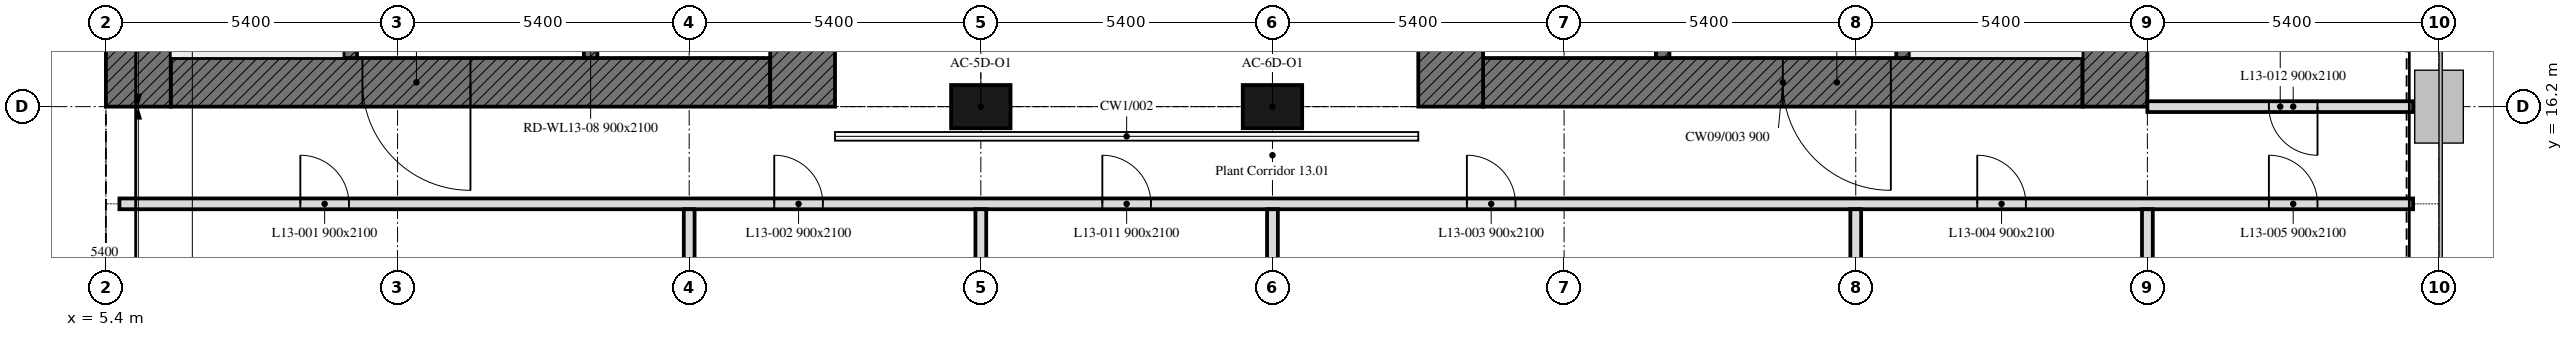
"""IFC4 building model, lengths in metres.
Left out: names, types, materials, properties, quantities, classifications, styles, units other than length and angle.
Written with IfcOpenShell. Run it as: python <this file> out.ifc"""

import sys

from ifc_helpers import new_model, si_unit, direction, frame, frame_2d, origin, origin_2d, place, context, subcontext, project, spatial, rectangle, extrude, element, fill, save


model = new_model("IFC4")
c1 = context("Model", 3, precision=1e-05, world=origin(), true_north=direction((0.0, 1.0)))
c2 = subcontext(c1, "Body", "Model", "MODEL_VIEW")
j1 = project(units=[si_unit("LENGTHUNIT", "METRE"), si_unit("PLANEANGLEUNIT", "RADIAN")], contexts=[c1])
p1 = place(None, origin())
s1 = spatial("IfcSite", under=j1, at=p1, CompositionType="ELEMENT")
p2 = place(p1, origin())
s2 = spatial("IfcBuilding", under=s1, at=p2, CompositionType="ELEMENT")
p3 = place(p2, frame((0.0, 0.0, 60.2)))
s3 = spatial("IfcBuildingStorey", under=s2, at=p3, CompositionType="ELEMENT", Elevation=60.2)
for number, where, z_axis, x_axis in (
    (1, (21.6, 16.2, 0.0), (0.0, 0.0, 1.0), (1.0, 0.0, 0.0)),
    (2, (27.0, 16.2, 0.0), (0.0, 0.0, 1.0), (1.0, 0.0, 0.0)),
):
    element("IfcColumn", number, at=place(p3, frame(where, z_axis=z_axis, x_axis=x_axis)), inside=s3, PredefinedType="COLUMN", context=c2, shape_type="SweptSolid", body=[
        extrude(rectangle(XDim=1.1, YDim=0.8, at=origin_2d()), origin(), (0.0, 0.0, 1.0), 4.5),
    ])
p4 = place(p3, frame((17.7, 16.65, 0.0), z_axis=(0.0, 0.0, 1.0), x_axis=(-1.0, 0.0, 0.0)))
e3 = element("IfcWall", 3, at=p4, inside=s3, PredefinedType="SOLIDWALL", context=c2, shape_type="SweptSolid", body=[
    extrude(rectangle(XDim=11.1, YDim=0.9, at=frame_2d((5.55, 0.0))), origin(), (0.0, 0.0, 1.0), 4.5),
])
p5 = place(p4, frame((5.55, 0.0, 0.0)))
e4 = element("IfcOpeningElement", 4, at=p5, cuts=e3, PredefinedType="OPENING", context=c2, shape_type="SweptSolid", body=[
    extrude(rectangle(XDim=2.0, YDim=2.4, at=frame_2d((1.0, 1.2))), frame((0.0, 0.45, 0.0), z_axis=(0.0, -1.0, 0.0), x_axis=(1.0, 0.0, 0.0)), (0.0, 0.0, 1.0), 0.9),
])
for number, where, z_axis, x_axis in (
    (5, (6.0, 16.2, 0.0), (0.0, 0.0, 1.0), (0.0, 1.0, 0.0)),
    (6, (18.3, 32.4, 0.0), (0.0, 0.0, 1.0), (0.0, -1.0, 0.0)),
):
    element("IfcWall", number, at=place(p3, frame(where, z_axis=z_axis, x_axis=x_axis)), inside=s3, PredefinedType="SOLIDWALL", context=c2, shape_type="SweptSolid", body=[
        extrude(rectangle(XDim=16.2, YDim=1.2, at=frame_2d((8.1, 0.0))), origin(), (0.0, 0.0, 1.0), 4.5),
    ])
p6 = place(p3, frame((9.925, 17.1, 0.0), z_axis=(0.0, 0.0, 1.0), x_axis=(0.0, 1.0, 0.0)))
e7 = element("IfcWall", 7, at=p6, inside=s3, PredefinedType="SOLIDWALL", context=c2, shape_type="SweptSolid", body=[
    extrude(rectangle(XDim=14.4, YDim=0.25, at=frame_2d((7.2, 0.0))), origin(), (0.0, 0.0, 1.0), 4.5),
])
p7 = place(p6, frame((4.6, 0.0, 0.0)))
e8 = element("IfcOpeningElement", 8, at=p7, cuts=e7, PredefinedType="OPENING", context=c2, shape_type="SweptSolid", body=[
    extrude(rectangle(XDim=1.0, YDim=2.1, at=frame_2d((0.5, 1.05))), frame((0.0, 0.125, 0.0), z_axis=(0.0, -1.0, 0.0), x_axis=(1.0, 0.0, 0.0)), (0.0, 0.0, 1.0), 0.25),
])
p8 = place(p6, frame((7.062, 0.0, 0.0)))
e9 = element("IfcOpeningElement", 9, at=p8, cuts=e7, PredefinedType="OPENING", context=c2, shape_type="SweptSolid", body=[
    extrude(rectangle(XDim=1.2, YDim=2.1, at=frame_2d((0.6, 1.05))), frame((0.0, 0.125, 0.0), z_axis=(0.0, -1.0, 0.0), x_axis=(1.0, 0.0, 0.0)), (0.0, 0.0, 1.0), 0.25),
])
p9 = place(p3, frame((14.375, 17.1, 0.0), z_axis=(0.0, 0.0, 1.0), x_axis=(0.0, 1.0, 0.0)))
e10 = element("IfcWall", 10, at=p9, inside=s3, PredefinedType="SOLIDWALL", context=c2, shape_type="SweptSolid", body=[
    extrude(rectangle(XDim=14.4, YDim=0.25, at=frame_2d((7.2, 0.0))), origin(), (0.0, 0.0, 1.0), 4.5),
])
p10 = place(p9, frame((13.15, 0.0, 0.0)))
e11 = element("IfcOpeningElement", 11, at=p10, cuts=e10, PredefinedType="OPENING", context=c2, shape_type="SweptSolid", body=[
    extrude(rectangle(XDim=1.0, YDim=2.1, at=frame_2d((0.5, 1.05))), frame((0.0, 0.125, 0.0), z_axis=(0.0, -1.0, 0.0), x_axis=(1.0, 0.0, 0.0)), (0.0, 0.0, 1.0), 0.25),
])
p11 = place(p9, frame((0.846, 0.0, 0.0)))
e12 = element("IfcOpeningElement", 12, at=p11, cuts=e10, PredefinedType="OPENING", context=c2, shape_type="SweptSolid", body=[
    extrude(rectangle(XDim=0.9, YDim=2.1, at=frame_2d((0.45, 1.05))), frame((0.0, 0.125, 0.0), z_axis=(0.0, -1.0, 0.0), x_axis=(1.0, 0.0, 0.0)), (0.0, 0.0, 1.0), 0.25),
])
p12 = place(p9, frame((3.346, 0.0, 0.0)))
e13 = element("IfcOpeningElement", 13, at=p12, cuts=e10, PredefinedType="OPENING", context=c2, shape_type="SweptSolid", body=[
    extrude(rectangle(XDim=0.9, YDim=2.1, at=frame_2d((0.45, 1.05))), frame((0.0, 0.125, 0.0), z_axis=(0.0, -1.0, 0.0), x_axis=(1.0, 0.0, 0.0)), (0.0, 0.0, 1.0), 0.25),
])
p13 = place(p3, frame((42.0, 16.65, 0.0), z_axis=(0.0, 0.0, 1.0), x_axis=(-1.0, 0.0, 0.0)))
e14 = element("IfcWall", 14, at=p13, inside=s3, PredefinedType="SOLIDWALL", context=c2, shape_type="SweptSolid", body=[
    extrude(rectangle(XDim=11.1, YDim=0.9, at=frame_2d((5.55, 0.0))), origin(), (0.0, 0.0, 1.0), 4.5),
])
p14 = place(p13, frame((3.55, 0.0, 0.0)))
e15 = element("IfcOpeningElement", 15, at=p14, cuts=e14, PredefinedType="OPENING", context=c2, shape_type="SweptSolid", body=[
    extrude(rectangle(XDim=2.0, YDim=2.4, at=frame_2d((1.0, 1.2))), frame((0.0, 0.45, 0.0), z_axis=(0.0, -1.0, 0.0), x_axis=(1.0, 0.0, 0.0)), (0.0, 0.0, 1.0), 0.9),
])
for number, where, z_axis, x_axis in (
    (16, (42.6, 32.4, 0.0), (0.0, 0.0, 1.0), (0.0, -1.0, 0.0)),
    (17, (30.3, 16.2, 0.0), (0.0, 0.0, 1.0), (0.0, 1.0, 0.0)),
):
    element("IfcWall", number, at=place(p3, frame(where, z_axis=z_axis, x_axis=x_axis)), inside=s3, PredefinedType="SOLIDWALL", context=c2, shape_type="SweptSolid", body=[
        extrude(rectangle(XDim=16.2, YDim=1.2, at=frame_2d((8.1, 0.0))), origin(), (0.0, 0.0, 1.0), 4.5),
    ])
p15 = place(p3, frame((38.675, 17.1, 0.0), z_axis=(0.0, 0.0, 1.0), x_axis=(0.0, 1.0, 0.0)))
e18 = element("IfcWall", 18, at=p15, inside=s3, PredefinedType="SOLIDWALL", context=c2, shape_type="SweptSolid", body=[
    extrude(rectangle(XDim=14.4, YDim=0.25, at=frame_2d((7.2, 0.0))), origin(), (0.0, 0.0, 1.0), 4.5),
])
p16 = place(p15, frame((4.6, 0.0, 0.0)))
e19 = element("IfcOpeningElement", 19, at=p16, cuts=e18, PredefinedType="OPENING", context=c2, shape_type="SweptSolid", body=[
    extrude(rectangle(XDim=1.0, YDim=2.1, at=frame_2d((0.5, 1.05))), frame((0.0, 0.125, 0.0), z_axis=(0.0, -1.0, 0.0), x_axis=(1.0, 0.0, 0.0)), (0.0, 0.0, 1.0), 0.25),
])
p17 = place(p15, frame((7.062, 0.0, 0.0)))
e20 = element("IfcOpeningElement", 20, at=p17, cuts=e18, PredefinedType="OPENING", context=c2, shape_type="SweptSolid", body=[
    extrude(rectangle(XDim=1.2, YDim=2.1, at=frame_2d((0.6, 1.05))), frame((0.0, 0.125, 0.0), z_axis=(0.0, -1.0, 0.0), x_axis=(1.0, 0.0, 0.0)), (0.0, 0.0, 1.0), 0.25),
])
p18 = place(p3, frame((34.225, 17.1, 0.0), z_axis=(0.0, 0.0, 1.0), x_axis=(0.0, 1.0, 0.0)))
e21 = element("IfcWall", 21, at=p18, inside=s3, PredefinedType="SOLIDWALL", context=c2, shape_type="SweptSolid", body=[
    extrude(rectangle(XDim=14.4, YDim=0.25, at=frame_2d((7.2, 0.0))), origin(), (0.0, 0.0, 1.0), 4.5),
])
p19 = place(p18, frame((13.15, 0.0, 0.0)))
e22 = element("IfcOpeningElement", 22, at=p19, cuts=e21, PredefinedType="OPENING", context=c2, shape_type="SweptSolid", body=[
    extrude(rectangle(XDim=1.0, YDim=2.1, at=frame_2d((0.5, 1.05))), frame((0.0, 0.125, 0.0), z_axis=(0.0, -1.0, 0.0), x_axis=(1.0, 0.0, 0.0)), (0.0, 0.0, 1.0), 0.25),
])
p20 = place(p18, frame((0.846, 0.0, 0.0)))
e23 = element("IfcOpeningElement", 23, at=p20, cuts=e21, PredefinedType="OPENING", context=c2, shape_type="SweptSolid", body=[
    extrude(rectangle(XDim=0.9, YDim=2.1, at=frame_2d((0.45, 1.05))), frame((0.0, 0.125, 0.0), z_axis=(0.0, -1.0, 0.0), x_axis=(1.0, 0.0, 0.0)), (0.0, 0.0, 1.0), 0.25),
])
p21 = place(p18, frame((3.346, 0.0, 0.0)))
e24 = element("IfcOpeningElement", 24, at=p21, cuts=e21, PredefinedType="OPENING", context=c2, shape_type="SweptSolid", body=[
    extrude(rectangle(XDim=0.9, YDim=2.1, at=frame_2d((0.45, 1.05))), frame((0.0, 0.125, 0.0), z_axis=(0.0, -1.0, 0.0), x_axis=(1.0, 0.0, 0.0)), (0.0, 0.0, 1.0), 0.25),
])
p22 = place(p3, frame((48.12, 16.2, 0.0), z_axis=(0.0, 0.0, 1.0), x_axis=(-1.0, 0.0, 0.0)))
e25 = element("IfcWall", 25, at=p22, inside=s3, PredefinedType="PARTITIONING", context=c2, shape_type="SweptSolid", body=[
    extrude(rectangle(XDim=4.92, YDim=0.2, at=frame_2d((2.46, 0.0))), origin(), (0.0, 0.0, 1.0), 3.75),
])
p23 = place(p22, frame((1.77, 0.0, 0.0)))
e26 = element("IfcOpeningElement", 26, at=p23, cuts=e25, PredefinedType="OPENING", context=c2, shape_type="SweptSolid", body=[
    extrude(rectangle(XDim=0.9, YDim=2.1, at=frame_2d((0.45, 1.05))), frame((0.0, 0.1, 0.0), z_axis=(0.0, -1.0, 0.0), x_axis=(1.0, 0.0, 0.0)), (0.0, 0.0, 1.0), 0.2),
])
p24 = place(p3, frame((5.65, 14.4, 0.0), z_axis=(0.0, 0.0, 1.0), x_axis=(1.0, 0.0, 0.0)))
e27 = element("IfcWall", 27, at=p24, inside=s3, PredefinedType="PARTITIONING", context=c2, shape_type="SweptSolid", body=[
    extrude(rectangle(XDim=42.47, YDim=0.2, at=frame_2d((21.235, 0.0))), origin(), (0.0, 0.0, 1.0), 3.75),
])
p25 = place(p24, frame((3.35, 0.0, 0.0)))
e28 = element("IfcOpeningElement", 28, at=p25, cuts=e27, PredefinedType="OPENING", context=c2, shape_type="SweptSolid", body=[
    extrude(rectangle(XDim=0.9, YDim=2.1, at=frame_2d((0.45, 1.05))), frame((0.0, 0.1, 0.0), z_axis=(0.0, -1.0, 0.0), x_axis=(1.0, 0.0, 0.0)), (0.0, 0.0, 1.0), 0.2),
])
p26 = place(p24, frame((12.125, 0.0, 0.0)))
e29 = element("IfcOpeningElement", 29, at=p26, cuts=e27, PredefinedType="OPENING", context=c2, shape_type="SweptSolid", body=[
    extrude(rectangle(XDim=0.9, YDim=2.1, at=frame_2d((0.45, 1.05))), frame((0.0, 0.1, 0.0), z_axis=(0.0, -1.0, 0.0), x_axis=(1.0, 0.0, 0.0)), (0.0, 0.0, 1.0), 0.2),
])
p27 = place(p24, frame((24.95, 0.0, 0.0)))
e30 = element("IfcOpeningElement", 30, at=p27, cuts=e27, PredefinedType="OPENING", context=c2, shape_type="SweptSolid", body=[
    extrude(rectangle(XDim=0.9, YDim=2.1, at=frame_2d((0.45, 1.05))), frame((0.0, 0.1, 0.0), z_axis=(0.0, -1.0, 0.0), x_axis=(1.0, 0.0, 0.0)), (0.0, 0.0, 1.0), 0.2),
])
p28 = place(p24, frame((34.4, 0.0, 0.0)))
e31 = element("IfcOpeningElement", 31, at=p28, cuts=e27, PredefinedType="OPENING", context=c2, shape_type="SweptSolid", body=[
    extrude(rectangle(XDim=0.9, YDim=2.1, at=frame_2d((0.45, 1.05))), frame((0.0, 0.1, 0.0), z_axis=(0.0, -1.0, 0.0), x_axis=(1.0, 0.0, 0.0)), (0.0, 0.0, 1.0), 0.2),
])
p29 = place(p24, frame((39.8, 0.0, 0.0)))
e32 = element("IfcOpeningElement", 32, at=p29, cuts=e27, PredefinedType="OPENING", context=c2, shape_type="SweptSolid", body=[
    extrude(rectangle(XDim=0.9, YDim=2.1, at=frame_2d((0.45, 1.05))), frame((0.0, 0.1, 0.0), z_axis=(0.0, -1.0, 0.0), x_axis=(1.0, 0.0, 0.0)), (0.0, 0.0, 1.0), 0.2),
])
p30 = place(p24, frame((18.2, 0.0, 0.0)))
e33 = element("IfcOpeningElement", 33, at=p30, cuts=e27, PredefinedType="OPENING", context=c2, shape_type="SweptSolid", body=[
    extrude(rectangle(XDim=0.9, YDim=2.1, at=frame_2d((0.45, 1.05))), frame((0.0, 0.1, 0.0), z_axis=(0.0, -1.0, 0.0), x_axis=(1.0, 0.0, 0.0)), (0.0, 0.0, 1.0), 0.2),
])
for number, where, z_axis, x_axis in (
    (34, (16.2, 11.451, 0.0), (0.0, 0.0, 1.0), (0.0, 1.0, 0.0)),
    (35, (21.6, 11.451, 0.0), (0.0, 0.0, 1.0), (0.0, 1.0, 0.0)),
    (36, (37.8, 11.451, 0.0), (0.0, 0.0, 1.0), (0.0, 1.0, 0.0)),
    (37, (27.0, 14.3, 0.0), (0.0, 0.0, 1.0), (0.0, -1.0, 0.0)),
):
    element("IfcWall", number, at=place(p3, frame(where, z_axis=z_axis, x_axis=x_axis)), inside=s3, PredefinedType="PARTITIONING", context=c2, shape_type="SweptSolid", body=[
        extrude(rectangle(XDim=2.849, YDim=0.2, at=frame_2d((1.425, 0.0))), origin(), (0.0, 0.0, 1.0), 3.75),
    ])
p31 = place(p3, frame((43.2, 11.451, 0.0), z_axis=(0.0, 0.0, 1.0), x_axis=(0.0, 1.0, 0.0)))
e38 = element("IfcWall", 38, at=p31, inside=s3, PredefinedType="PARTITIONING", context=c2, shape_type="SweptSolid", body=[
    extrude(rectangle(XDim=2.849, YDim=0.2, at=frame_2d((1.425, 0.0))), origin(), (0.0, 0.0, 1.0), 4.5),
])
p32 = place(p5, origin())
e39 = element("IfcDoor", 39, at=p32, inside=s3, OperationType="DOUBLE_DOOR_SINGLE_SWING", PredefinedType="DOOR", context=c2, shape_type="SweptSolid", body=[
    extrude(rectangle(XDim=2.0, YDim=2.4, at=frame_2d((1.0, 1.2))), frame((0.0, 0.025, 0.0), z_axis=(0.0, -1.0, 0.0), x_axis=(1.0, 0.0, 0.0)), (0.0, 0.0, 1.0), 0.05),
])
fill(e4, e39)
p33 = place(p14, origin())
e40 = element("IfcDoor", 40, at=p33, inside=s3, OperationType="DOUBLE_DOOR_SINGLE_SWING", PredefinedType="DOOR", context=c2, shape_type="SweptSolid", body=[
    extrude(rectangle(XDim=2.0, YDim=2.4, at=frame_2d((1.0, 1.2))), frame((0.0, 0.025, 0.0), z_axis=(0.0, -1.0, 0.0), x_axis=(1.0, 0.0, 0.0)), (0.0, 0.0, 1.0), 0.05),
])
fill(e15, e40)
p34 = place(p25, origin())
e41 = element("IfcDoor", 41, at=p34, inside=s3, OperationType="SINGLE_SWING_LEFT", PredefinedType="DOOR", context=c2, shape_type="SweptSolid", body=[
    extrude(rectangle(XDim=0.9, YDim=2.1, at=frame_2d((0.45, 1.05))), frame((0.0, 0.025, 0.0), z_axis=(0.0, -1.0, 0.0), x_axis=(1.0, 0.0, 0.0)), (0.0, 0.0, 1.0), 0.05),
])
fill(e28, e41)
p35 = place(p26, origin())
e42 = element("IfcDoor", 42, at=p35, inside=s3, OperationType="SINGLE_SWING_LEFT", PredefinedType="DOOR", context=c2, shape_type="SweptSolid", body=[
    extrude(rectangle(XDim=0.9, YDim=2.1, at=frame_2d((0.45, 1.05))), frame((0.0, 0.025, 0.0), z_axis=(0.0, -1.0, 0.0), x_axis=(1.0, 0.0, 0.0)), (0.0, 0.0, 1.0), 0.05),
])
fill(e29, e42)
p36 = place(p27, origin())
e43 = element("IfcDoor", 43, at=p36, inside=s3, OperationType="SINGLE_SWING_LEFT", PredefinedType="DOOR", context=c2, shape_type="SweptSolid", body=[
    extrude(rectangle(XDim=0.9, YDim=2.1, at=frame_2d((0.45, 1.05))), frame((0.0, 0.025, 0.0), z_axis=(0.0, -1.0, 0.0), x_axis=(1.0, 0.0, 0.0)), (0.0, 0.0, 1.0), 0.05),
])
fill(e30, e43)
p37 = place(p28, origin())
e44 = element("IfcDoor", 44, at=p37, inside=s3, OperationType="SINGLE_SWING_RIGHT", PredefinedType="DOOR", context=c2, shape_type="SweptSolid", body=[
    extrude(rectangle(XDim=0.9, YDim=2.1, at=frame_2d((0.45, 1.05))), frame((0.0, 0.025, 0.0), z_axis=(0.0, -1.0, 0.0), x_axis=(1.0, 0.0, 0.0)), (0.0, 0.0, 1.0), 0.05),
])
fill(e31, e44)
p38 = place(p29, origin())
e45 = element("IfcDoor", 45, at=p38, inside=s3, OperationType="SINGLE_SWING_RIGHT", PredefinedType="DOOR", context=c2, shape_type="SweptSolid", body=[
    extrude(rectangle(XDim=0.9, YDim=2.1, at=frame_2d((0.45, 1.05))), frame((0.0, 0.025, 0.0), z_axis=(0.0, -1.0, 0.0), x_axis=(1.0, 0.0, 0.0)), (0.0, 0.0, 1.0), 0.05),
])
fill(e32, e45)
p39 = place(p30, origin())
e46 = element("IfcDoor", 46, at=p39, inside=s3, OperationType="SINGLE_SWING_RIGHT", PredefinedType="DOOR", context=c2, shape_type="SweptSolid", body=[
    extrude(rectangle(XDim=0.9, YDim=2.1, at=frame_2d((0.45, 1.05))), frame((0.0, 0.025, 0.0), z_axis=(0.0, -1.0, 0.0), x_axis=(1.0, 0.0, 0.0)), (0.0, 0.0, 1.0), 0.05),
])
fill(e33, e46)
p40 = place(p23, origin())
e47 = element("IfcDoor", 47, at=p40, inside=s3, OperationType="SINGLE_SWING_LEFT", PredefinedType="DOOR", context=c2, shape_type="SweptSolid", body=[
    extrude(rectangle(XDim=0.9, YDim=2.1, at=frame_2d((0.45, 1.05))), frame((0.0, 0.025, 0.0), z_axis=(0.0, -1.0, 0.0), x_axis=(1.0, 0.0, 0.0)), (0.0, 0.0, 1.0), 0.05),
])
fill(e26, e47)
save(model, sys.argv[1])
